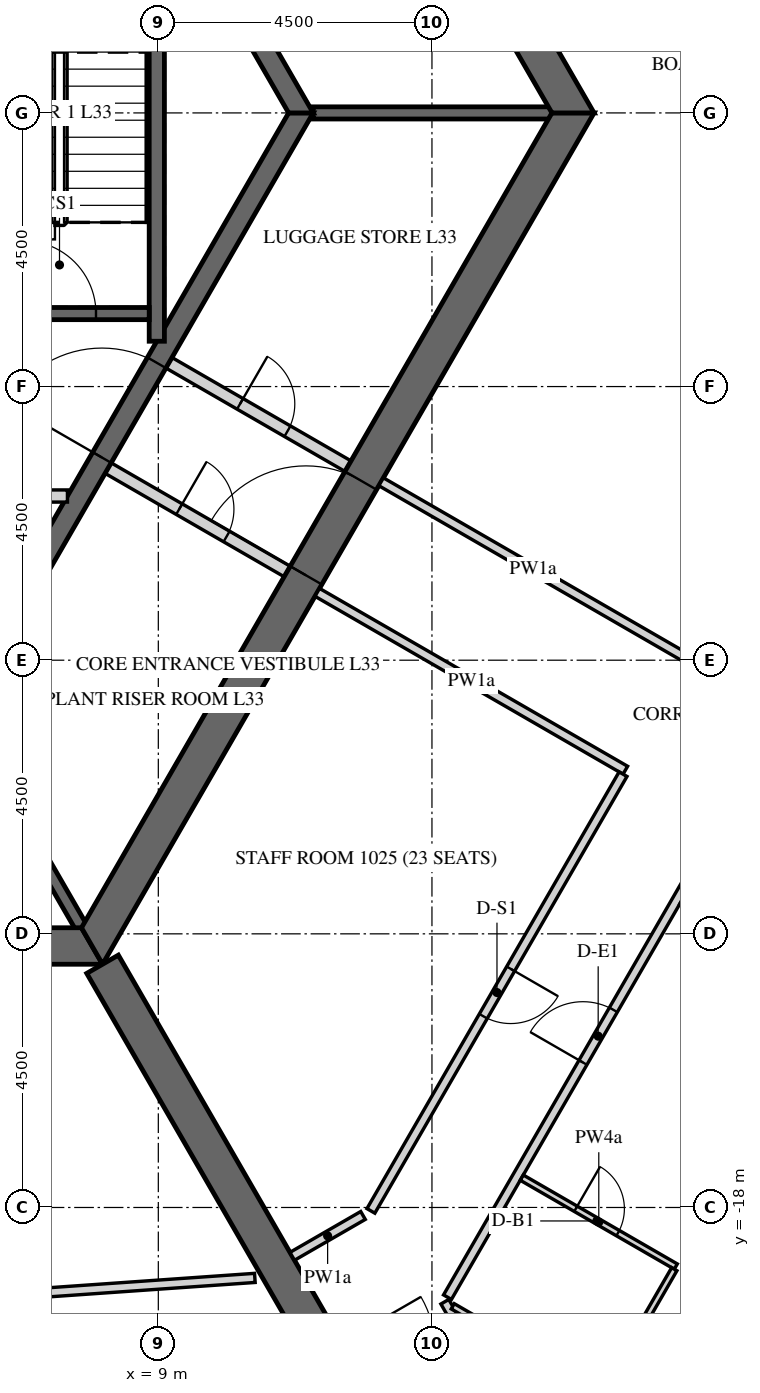
"""IFC4 building model, lengths in metres.
Left out: names, types, materials, properties, quantities, classifications, styles, units other than length and angle.
Written with IfcOpenShell. Run it as: python <this file> out.ifc"""

import sys

from ifc_helpers import new_model, si_unit, direction, frame, frame_2d, origin, place, context, subcontext, project, spatial, polyline, rectangle, outline, extrude, element, fill, save


model = new_model("IFC4")
c1 = context("Model", 3, precision=1e-05, world=origin(), true_north=direction((0.0, 1.0)))
c2 = subcontext(c1, "Body", "Model", "MODEL_VIEW")
j1 = project(units=[si_unit("LENGTHUNIT", "METRE"), si_unit("PLANEANGLEUNIT", "RADIAN")], contexts=[c1])
p1 = place(None, origin())
s1 = spatial("IfcSite", under=j1, at=p1, CompositionType="ELEMENT")
p2 = place(p1, origin())
s2 = spatial("IfcBuilding", under=s1, at=p2, CompositionType="ELEMENT")
p3 = place(p2, frame((0.0, 0.0, 142.8)))
s3 = spatial("IfcBuildingStorey", under=s2, at=p3, CompositionType="ELEMENT", Elevation=142.8)
p4 = place(p3, frame((-7.91, -13.7, -0.15), z_axis=(0.0, 0.0, 1.0), x_axis=(1.0, 0.0, 0.0)))
e1 = element("IfcWall", 1, at=p4, inside=s3, PredefinedType="SHEAR", context=c2, shape_type="SweptSolid", body=[
    extrude(outline(polyline([(-0.173, -0.3), (15.993, -0.3), (15.646, 0.3), (0.173, 0.3), (-0.173, -0.3)])), origin(), (0.0, 0.0, 1.0), 3.75),
])
p5 = place(p4, frame((7.31, 0.0, 0.15)))
e2 = element("IfcOpeningElement", 2, at=p5, cuts=e1, PredefinedType="OPENING", context=c2, shape_type="SweptSolid", body=[
    extrude(rectangle(XDim=1.2, YDim=2.4, at=frame_2d((0.6, 1.2))), frame((0.0, 0.31, 0.0), z_axis=(0.0, -1.0, 0.0), x_axis=(1.0, 0.0, 0.0)), (0.0, 0.0, 1.0), 0.62),
])
p6 = place(p3, frame((7.91, -13.7, -0.15), z_axis=(0.0, 0.0, 1.0), x_axis=(0.499999880136, 0.866025472988, 0.0)))
e3 = element("IfcWall", 3, at=p6, inside=s3, PredefinedType="SHEAR", context=c2, shape_type="SweptSolid", body=[
    extrude(outline(polyline([(-0.173, -0.3), (15.993, -0.3), (15.646, 0.3), (0.173, 0.3), (-0.173, -0.3)])), origin(), (0.0, 0.0, 1.0), 3.75),
])
p7 = place(p6, frame((7.039, 0.0, 0.15)))
e4 = element("IfcOpeningElement", 4, at=p7, cuts=e3, PredefinedType="OPENING", context=c2, shape_type="SweptSolid", body=[
    extrude(rectangle(XDim=1.8, YDim=2.4, at=frame_2d((0.9, 1.2))), frame((0.0, 0.31, 0.0), z_axis=(0.0, -1.0, 0.0), x_axis=(1.0, 0.0, 0.0)), (0.0, 0.0, 1.0), 0.62),
])
p8 = place(p3, frame((15.819, 0.0, -0.15), z_axis=(0.0, 0.0, 1.0), x_axis=(-0.499999880136, 0.866025472988, 0.0)))
e5 = element("IfcWall", 5, at=p8, inside=s3, PredefinedType="SHEAR", context=c2, shape_type="SweptSolid", body=[
    extrude(outline(polyline([(-0.173, -0.3), (15.993, -0.3), (15.646, 0.3), (0.173, 0.3), (-0.173, -0.3)])), origin(), (0.0, 0.0, 1.0), 3.75),
])
p9 = place(p8, frame((6.981, 0.0, 0.15)))
e6 = element("IfcOpeningElement", 6, at=p9, cuts=e5, PredefinedType="OPENING", context=c2, shape_type="SweptSolid", body=[
    extrude(rectangle(XDim=1.8, YDim=2.4, at=frame_2d((0.9, 1.2))), frame((0.0, 0.31, 0.0), z_axis=(0.0, -1.0, 0.0), x_axis=(1.0, 0.0, 0.0)), (0.0, 0.0, 1.0), 0.62),
])
p10 = place(p3, frame((8.083, -14.0, -0.15), z_axis=(0.0, 0.0, 1.0), x_axis=(0.499997680643, -0.866026742862, 0.0)))
e7 = element("IfcWall", 7, at=p10, inside=s3, PredefinedType="SHEAR", context=c2, shape_type="SweptSolid", body=[
    extrude(rectangle(XDim=16.509, YDim=0.6, at=frame_2d((8.254, 0.0))), origin(), (0.0, 0.0, 1.0), 3.75),
])
p11 = place(p10, frame((7.354, 0.0, 0.15)))
e8 = element("IfcOpeningElement", 8, at=p11, cuts=e7, PredefinedType="OPENING", context=c2, shape_type="SweptSolid", body=[
    extrude(rectangle(XDim=1.8, YDim=2.4, at=frame_2d((0.9, 1.2))), frame((0.0, 0.31, 0.0), z_axis=(0.0, -1.0, 0.0), x_axis=(1.0, 0.0, 0.0)), (0.0, 0.0, 1.0), 0.62),
])
p12 = place(p3, frame((5.673, -9.825, -0.15), z_axis=(0.0, 0.0, 1.0), x_axis=(0.499995046907, 0.866028263435, 0.0)))
e9 = element("IfcWall", 9, at=p12, inside=s3, PredefinedType="SHEAR", context=c2, shape_type="SweptSolid", body=[
    extrude(outline(polyline([(-0.101, -0.175), (11.446, -0.175), (11.244, 0.175), (0.101, 0.175), (-0.101, -0.175)])), origin(), (0.0, 0.0, 1.0), 3.75),
])
p13 = place(p12, frame((4.801, 0.0, 0.15)))
e10 = element("IfcOpeningElement", 10, at=p13, cuts=e9, PredefinedType="OPENING", context=c2, shape_type="SweptSolid", body=[
    extrude(rectangle(XDim=1.8, YDim=2.4, at=frame_2d((0.9, 1.2))), frame((0.0, 0.185, 0.0), z_axis=(0.0, -1.0, 0.0), x_axis=(1.0, 0.0, 0.0)), (0.0, 0.0, 1.0), 0.37),
])
p14 = place(p3, frame((11.345, 0.0, -0.15), z_axis=(0.0, 0.0, 1.0), x_axis=(-0.499995046907, 0.866028263435, 0.0)))
e11 = element("IfcWall", 11, at=p14, inside=s3, PredefinedType="SHEAR", context=c2, shape_type="SweptSolid", body=[
    extrude(outline(polyline([(-0.101, -0.175), (11.446, -0.175), (11.244, 0.175), (0.101, 0.175), (-0.101, -0.175)])), origin(), (0.0, 0.0, 1.0), 3.75),
])
p15 = place(p14, frame((4.744, 0.0, 0.15)))
e12 = element("IfcOpeningElement", 12, at=p15, cuts=e11, PredefinedType="OPENING", context=c2, shape_type="SweptSolid", body=[
    extrude(rectangle(XDim=1.8, YDim=2.4, at=frame_2d((0.9, 1.2))), frame((0.0, 0.185, 0.0), z_axis=(0.0, -1.0, 0.0), x_axis=(1.0, 0.0, 0.0)), (0.0, 0.0, 1.0), 0.37),
])
p16 = place(p3, frame((3.7, -6.3, 0.0), z_axis=(0.0, 0.0, 1.0), x_axis=(1.0, 0.0, 0.0)))
e13 = element("IfcWall", 13, at=p16, inside=s3, PredefinedType="PARTITIONING", context=c2, shape_type="SweptSolid", body=[
    extrude(rectangle(XDim=3.806, YDim=0.2, at=frame_2d((1.903, 0.0))), origin(), (0.0, 0.0, 1.0), 3.65),
])
p17 = place(p16, frame((1.453, 0.0, 0.0)))
e14 = element("IfcOpeningElement", 14, at=p17, cuts=e13, PredefinedType="OPENING", context=c2, shape_type="SweptSolid", body=[
    extrude(rectangle(XDim=0.9, YDim=2.1, at=frame_2d((0.45, 1.05))), frame((0.0, 0.11, 0.0), z_axis=(0.0, -1.0, 0.0), x_axis=(1.0, 0.0, 0.0)), (0.0, 0.0, 1.0), 0.22),
])
p18 = place(p3, frame((11.547, 0.0, -0.15), z_axis=(0.0, 0.0, 1.0), x_axis=(1.0, 0.0, 0.0)))
e15 = element("IfcWall", 15, at=p18, inside=s3, PredefinedType="SHEAR", context=c2, shape_type="SweptSolid", body=[
    extrude(rectangle(XDim=3.926, YDim=0.2, at=frame_2d((1.963, 0.0))), origin(), (0.0, 0.0, 1.0), 3.75),
])
p19 = place(p3, frame((5.773, -10.0, -0.15), z_axis=(0.0, 0.0, 1.0), x_axis=(0.500038251005, -0.86600331843, 0.0)))
e16 = element("IfcWall", 16, at=p19, inside=s3, PredefinedType="SHEAR", context=c2, shape_type="SweptSolid", body=[
    extrude(rectangle(XDim=3.926, YDim=0.2, at=frame_2d((1.963, 0.0))), origin(), (0.0, 0.0, 1.0), 3.75),
])
p20 = place(p3, frame((9.175, -4.109, 0.0), z_axis=(0.0, 0.0, 1.0), x_axis=(0.865989465428, -0.500062241894, 0.0)))
e17 = element("IfcWall", 17, at=p20, inside=s3, PredefinedType="PARTITIONING", context=c2, shape_type="SweptSolid", body=[
    extrude(rectangle(XDim=3.4, YDim=0.2, at=frame_2d((1.7, 0.0))), origin(), (0.0, 0.0, 1.0), 3.65),
])
p21 = place(p20, frame((1.351, 0.0, 0.0)))
e18 = element("IfcOpeningElement", 18, at=p21, cuts=e17, PredefinedType="OPENING", context=c2, shape_type="SweptSolid", body=[
    extrude(rectangle(XDim=0.9, YDim=2.1, at=frame_2d((0.45, 1.05))), frame((0.0, 0.11, 0.0), z_axis=(0.0, -1.0, 0.0), x_axis=(1.0, 0.0, 0.0)), (0.0, 0.0, 1.0), 0.22),
])
p22 = place(p3, frame((8.175, -5.841, 0.0), z_axis=(0.0, 0.0, 1.0), x_axis=(0.866020560687, -0.500008388397, 0.0)))
e19 = element("IfcWall", 19, at=p22, inside=s3, PredefinedType="PARTITIONING", context=c2, shape_type="SweptSolid", body=[
    extrude(rectangle(XDim=3.4, YDim=0.2, at=frame_2d((1.7, 0.0))), origin(), (0.0, 0.0, 1.0), 3.65),
])
p23 = place(p22, frame((1.35, 0.0, 0.0)))
e20 = element("IfcOpeningElement", 20, at=p23, cuts=e19, PredefinedType="OPENING", context=c2, shape_type="SweptSolid", body=[
    extrude(rectangle(XDim=0.9, YDim=2.1, at=frame_2d((0.45, 1.05))), frame((0.0, 0.11, 0.0), z_axis=(0.0, -1.0, 0.0), x_axis=(1.0, 0.0, 0.0)), (0.0, 0.0, 1.0), 0.22),
])
p24 = place(p3, frame((8.975, -3.755, -0.25), z_axis=(0.0, 0.0, 1.0), x_axis=(0.0, 1.0, 0.0)))
e21 = element("IfcWall", 21, at=p24, inside=s3, PredefinedType="SHEAR", context=c2, shape_type="SweptSolid", body=[
    extrude(rectangle(XDim=7.51, YDim=0.25, at=frame_2d((3.755, 0.0))), origin(), (0.0, 0.0, 1.0), 3.9),
])
p25 = place(p3, frame((5.9, -3.3, -0.25), z_axis=(0.0, 0.0, 1.0), x_axis=(1.0, 0.0, 0.0)))
e22 = element("IfcWall", 22, at=p25, inside=s3, PredefinedType="SHEAR", context=c2, shape_type="SweptSolid", body=[
    extrude(rectangle(XDim=2.95, YDim=0.2, at=frame_2d((1.475, 0.0))), origin(), (0.0, 0.0, 1.0), 3.9),
])
p26 = place(p25, frame((0.875, 0.0, 0.25)))
e23 = element("IfcOpeningElement", 23, at=p26, cuts=e22, PredefinedType="OPENING", context=c2, shape_type="SweptSolid", body=[
    extrude(rectangle(XDim=1.2, YDim=2.4, at=frame_2d((0.6, 1.2))), frame((0.0, 0.11, 0.0), z_axis=(0.0, -1.0, 0.0), x_axis=(1.0, 0.0, 0.0)), (0.0, 0.0, 1.0), 0.22),
])
p27 = place(p3, frame((10.587, -19.158, 0.0), z_axis=(0.0, 0.0, 1.0), x_axis=(-0.997565137136, -0.069740928955, 0.0)))
e24 = element("IfcWall", 24, at=p27, inside=s3, PredefinedType="PARTITIONING", context=c2, shape_type="SweptSolid", body=[
    extrude(rectangle(XDim=9.861, YDim=0.15, at=frame_2d((4.931, 0.0))), origin(), (0.0, 0.0, 1.0), 2.838),
])
p28 = place(p27, frame((4.481, 0.0, 0.0)))
e25 = element("IfcOpeningElement", 25, at=p28, cuts=e24, PredefinedType="OPENING", context=c2, shape_type="SweptSolid", body=[
    extrude(rectangle(XDim=0.9, YDim=2.1, at=frame_2d((0.45, 1.05))), frame((0.0, 0.085, 0.0), z_axis=(0.0, -1.0, 0.0), x_axis=(1.0, 0.0, 0.0)), (0.0, 0.0, 1.0), 0.17),
])
p29 = place(p3, frame((15.441, -22.545, 0.0), z_axis=(0.0, 0.0, 1.0), x_axis=(-0.500003541824, 0.866023358902, 0.0)))
e26 = element("IfcWall", 26, at=p29, inside=s3, PredefinedType="PARTITIONING", context=c2, shape_type="SweptSolid", body=[
    extrude(rectangle(XDim=3.458, YDim=0.15, at=frame_2d((1.729, 0.0))), origin(), (0.0, 0.0, 1.0), 2.838),
])
p30 = place(p3, frame((13.755, -19.475, 0.0), z_axis=(0.0, 0.0, 1.0), x_axis=(0.50000013933, 0.866025323342, 0.0)))
e27 = element("IfcWall", 27, at=p30, inside=s3, PredefinedType="PARTITIONING", context=c2, shape_type="SweptSolid", body=[
    extrude(rectangle(XDim=23.517, YDim=0.15, at=frame_2d((11.758, 0.0))), origin(), (0.0, 0.0, 1.0), 2.838),
])
p31 = place(p30, frame((4.456, 0.0, 0.0)))
e28 = element("IfcOpeningElement", 28, at=p31, cuts=e27, PredefinedType="OPENING", context=c2, shape_type="SweptSolid", body=[
    extrude(rectangle(XDim=1.0, YDim=2.1, at=frame_2d((0.5, 1.05))), frame((0.0, 0.085, 0.0), z_axis=(0.0, -1.0, 0.0), x_axis=(1.0, 0.0, 0.0)), (0.0, 0.0, 1.0), 0.17),
])
p32 = place(p30, frame((13.699, 0.0, 0.0)))
e29 = element("IfcOpeningElement", 29, at=p32, cuts=e27, PredefinedType="OPENING", context=c2, shape_type="SweptSolid", body=[
    extrude(rectangle(XDim=1.0, YDim=2.1, at=frame_2d((0.5, 1.05))), frame((0.0, 0.085, 0.0), z_axis=(0.0, -1.0, 0.0), x_axis=(1.0, 0.0, 0.0)), (0.0, 0.0, 1.0), 0.17),
])
p33 = place(p30, frame((21.658, 0.0, 0.0)))
e30 = element("IfcOpeningElement", 30, at=p33, cuts=e27, PredefinedType="OPENING", context=c2, shape_type="SweptSolid", body=[
    extrude(rectangle(XDim=1.0, YDim=2.1, at=frame_2d((0.5, 1.05))), frame((0.0, 0.085, 0.0), z_axis=(0.0, -1.0, 0.0), x_axis=(1.0, 0.0, 0.0)), (0.0, 0.0, 1.0), 0.17),
])
p34 = place(p3, frame((25.467, 0.96, 0.0), z_axis=(0.0, 0.0, 1.0), x_axis=(-0.559200743185, 0.829032284547, 0.0)))
e31 = element("IfcWall", 31, at=p34, inside=s3, PredefinedType="PARTITIONING", context=c2, shape_type="SweptSolid", body=[
    extrude(rectangle(XDim=21.668, YDim=0.15, at=frame_2d((10.834, 0.0))), origin(), (0.0, 0.0, 1.0), 2.838),
])
p35 = place(p34, frame((10.434, 0.0, 0.0)))
e32 = element("IfcOpeningElement", 32, at=p35, cuts=e31, PredefinedType="OPENING", context=c2, shape_type="SweptSolid", body=[
    extrude(rectangle(XDim=1.0, YDim=2.1, at=frame_2d((0.5, 1.05))), frame((0.0, 0.085, 0.0), z_axis=(0.0, -1.0, 0.0), x_axis=(1.0, 0.0, 0.0)), (0.0, 0.0, 1.0), 0.17),
])
p36 = place(p3, frame((17.665, -8.953, 0.0), z_axis=(0.0, 0.0, 1.0), x_axis=(-0.866025774745, 0.499999357477, 0.0)))
e33 = element("IfcWall", 33, at=p36, inside=s3, PredefinedType="PARTITIONING", context=c2, shape_type="SweptSolid", body=[
    extrude(rectangle(XDim=5.775, YDim=0.15, at=frame_2d((2.887, 0.0))), origin(), (0.0, 0.0, 1.0), 2.838),
])
p37 = place(p3, frame((11.614, -7.884, 0.0), z_axis=(0.0, 0.0, 1.0), x_axis=(0.866018092707, -0.500012662943, 0.0)))
e34 = element("IfcWall", 34, at=p37, inside=s3, PredefinedType="PARTITIONING", context=c2, shape_type="SweptSolid", body=[
    extrude(rectangle(XDim=5.85, YDim=0.15, at=frame_2d((2.925, 0.0))), origin(), (0.0, 0.0, 1.0), 2.838),
])
p38 = place(p3, frame((16.643, -10.874, 0.0), z_axis=(0.0, 0.0, 1.0), x_axis=(-0.50000192383, -0.866024293058, 0.0)))
e35 = element("IfcWall", 35, at=p38, inside=s3, PredefinedType="PARTITIONING", context=c2, shape_type="SweptSolid", body=[
    extrude(rectangle(XDim=8.293, YDim=0.15, at=frame_2d((4.146, 0.0))), origin(), (0.0, 0.0, 1.0), 2.838),
])
p39 = place(p38, frame((3.697, 0.0, 0.0)))
e36 = element("IfcOpeningElement", 36, at=p39, cuts=e35, PredefinedType="OPENING", context=c2, shape_type="SweptSolid", body=[
    extrude(rectangle(XDim=0.9, YDim=2.1, at=frame_2d((0.45, 1.05))), frame((0.0, 0.085, 0.0), z_axis=(0.0, -1.0, 0.0), x_axis=(1.0, 0.0, 0.0)), (0.0, 0.0, 1.0), 0.17),
])
p40 = place(p3, frame((12.366, -18.131, 0.0), z_axis=(0.0, 0.0, 1.0), x_axis=(-0.866043397086, -0.499968833392, 0.0)))
e37 = element("IfcWall", 37, at=p40, inside=s3, PredefinedType="PARTITIONING", context=c2, shape_type="SweptSolid", body=[
    extrude(rectangle(XDim=1.344, YDim=0.15, at=frame_2d((0.672, 0.0))), origin(), (0.0, 0.0, 1.0), 2.838),
])
p41 = place(p3, frame((14.977, -17.509, 0.0), z_axis=(0.0, 0.0, 1.0), x_axis=(0.866046596414, -0.499963291492, 0.0)))
e38 = element("IfcWall", 38, at=p41, inside=s3, PredefinedType="PARTITIONING", context=c2, shape_type="SweptSolid", body=[
    extrude(rectangle(XDim=2.925, YDim=0.1, at=frame_2d((1.462, 0.0))), origin(), (0.0, 0.0, 1.0), 2.838),
])
p42 = place(p41, frame((1.025, 0.0, 0.0)))
e39 = element("IfcOpeningElement", 39, at=p42, cuts=e38, PredefinedType="OPENING", context=c2, shape_type="SweptSolid", body=[
    extrude(rectangle(XDim=0.8, YDim=2.1, at=frame_2d((0.4, 1.05))), frame((0.0, 0.06, 0.0), z_axis=(0.0, -1.0, 0.0), x_axis=(1.0, 0.0, 0.0)), (0.0, 0.0, 1.0), 0.12),
])
p43 = place(p3, frame((17.485, -19.015, 0.0), z_axis=(0.0, 0.0, 1.0), x_axis=(-0.500016218704, -0.866016039709, 0.0)))
e40 = element("IfcWall", 40, at=p43, inside=s3, PredefinedType="PARTITIONING", context=c2, shape_type="SweptSolid", body=[
    extrude(rectangle(XDim=2.35, YDim=0.1, at=frame_2d((1.175, 0.0))), origin(), (0.0, 0.0, 1.0), 2.838),
])
p44 = place(p3, frame((16.267, -21.025, 0.0), z_axis=(0.0, 0.0, 1.0), x_axis=(-0.866034573852, 0.49998411664, 0.0)))
e41 = element("IfcWall", 41, at=p44, inside=s3, PredefinedType="PARTITIONING", context=c2, shape_type="SweptSolid", body=[
    extrude(rectangle(XDim=2.8, YDim=0.1, at=frame_2d((1.4, 0.0))), origin(), (0.0, 0.0, 1.0), 2.838),
])
p45 = place(p3, frame((24.31, -16.794, 0.0), z_axis=(0.0, 0.0, 1.0), x_axis=(-0.866027174938, 0.499996932259, 0.0)))
e42 = element("IfcWall", 42, at=p45, inside=s3, PredefinedType="PARTITIONING", context=c2, shape_type="SweptSolid", body=[
    extrude(rectangle(XDim=7.725, YDim=0.18, at=frame_2d((3.863, 0.0))), origin(), (0.0, 0.0, 1.0), 2.838),
])
p46 = place(p7, origin())
e43 = element("IfcDoor", 43, at=p46, inside=s3, OperationType="DOUBLE_DOOR_SINGLE_SWING", PredefinedType="DOOR", context=c2, shape_type="SweptSolid", body=[
    extrude(rectangle(XDim=1.8, YDim=2.4, at=frame_2d((0.9, 1.2))), frame((0.0, 0.025, 0.0), z_axis=(0.0, -1.0, 0.0), x_axis=(1.0, 0.0, 0.0)), (0.0, 0.0, 1.0), 0.05),
])
fill(e4, e43)
p47 = place(p13, origin())
e44 = element("IfcDoor", 44, at=p47, inside=s3, OperationType="DOUBLE_DOOR_SINGLE_SWING", PredefinedType="DOOR", context=c2, shape_type="SweptSolid", body=[
    extrude(rectangle(XDim=1.8, YDim=2.4, at=frame_2d((0.9, 1.2))), frame((0.0, 0.025, 0.0), z_axis=(0.0, -1.0, 0.0), x_axis=(1.0, 0.0, 0.0)), (0.0, 0.0, 1.0), 0.05),
])
fill(e10, e44)
p48 = place(p21, origin())
e45 = element("IfcDoor", 45, at=p48, inside=s3, OperationType="SINGLE_SWING_LEFT", PredefinedType="DOOR", context=c2, shape_type="SweptSolid", body=[
    extrude(rectangle(XDim=0.9, YDim=2.1, at=frame_2d((0.45, 1.05))), frame((0.0, 0.025, 0.0), z_axis=(0.0, -1.0, 0.0), x_axis=(1.0, 0.0, 0.0)), (0.0, 0.0, 1.0), 0.05),
])
fill(e18, e45)
p49 = place(p23, origin())
e46 = element("IfcDoor", 46, at=p49, inside=s3, OperationType="SINGLE_SWING_LEFT", PredefinedType="DOOR", context=c2, shape_type="SweptSolid", body=[
    extrude(rectangle(XDim=0.9, YDim=2.1, at=frame_2d((0.45, 1.05))), frame((0.0, 0.025, 0.0), z_axis=(0.0, -1.0, 0.0), x_axis=(1.0, 0.0, 0.0)), (0.0, 0.0, 1.0), 0.05),
])
fill(e20, e46)
p50 = place(p26, origin())
e47 = element("IfcDoor", 47, at=p50, inside=s3, OperationType="SINGLE_SWING_LEFT", PredefinedType="DOOR", context=c2, shape_type="SweptSolid", body=[
    extrude(rectangle(XDim=1.2, YDim=2.4, at=frame_2d((0.6, 1.2))), frame((0.0, 0.025, 0.0), z_axis=(0.0, -1.0, 0.0), x_axis=(1.0, 0.0, 0.0)), (0.0, 0.0, 1.0), 0.05),
])
fill(e23, e47)
p51 = place(p31, origin())
e48 = element("IfcDoor", 48, at=p51, inside=s3, OperationType="SINGLE_SWING_LEFT", PredefinedType="DOOR", context=c2, shape_type="SweptSolid", body=[
    extrude(rectangle(XDim=1.0, YDim=2.1, at=frame_2d((0.5, 1.05))), frame((0.0, 0.025, 0.0), z_axis=(0.0, -1.0, 0.0), x_axis=(1.0, 0.0, 0.0)), (0.0, 0.0, 1.0), 0.05),
])
fill(e28, e48)
p52 = place(p42, origin())
e49 = element("IfcDoor", 49, at=p52, inside=s3, OperationType="SINGLE_SWING_RIGHT", PredefinedType="DOOR", context=c2, shape_type="SweptSolid", body=[
    extrude(rectangle(XDim=0.8, YDim=2.1, at=frame_2d((0.4, 1.05))), frame((0.0, 0.025, 0.0), z_axis=(0.0, -1.0, 0.0), x_axis=(1.0, 0.0, 0.0)), (0.0, 0.0, 1.0), 0.05),
])
fill(e39, e49)
p53 = place(p39, origin())
e50 = element("IfcDoor", 50, at=p53, inside=s3, OperationType="SINGLE_SWING_RIGHT", PredefinedType="DOOR", context=c2, shape_type="SweptSolid", body=[
    extrude(rectangle(XDim=0.9, YDim=2.1, at=frame_2d((0.45, 1.05))), frame((0.0, 0.025, 0.0), z_axis=(0.0, -1.0, 0.0), x_axis=(1.0, 0.0, 0.0)), (0.0, 0.0, 1.0), 0.05),
])
fill(e36, e50)
save(model, sys.argv[1])
